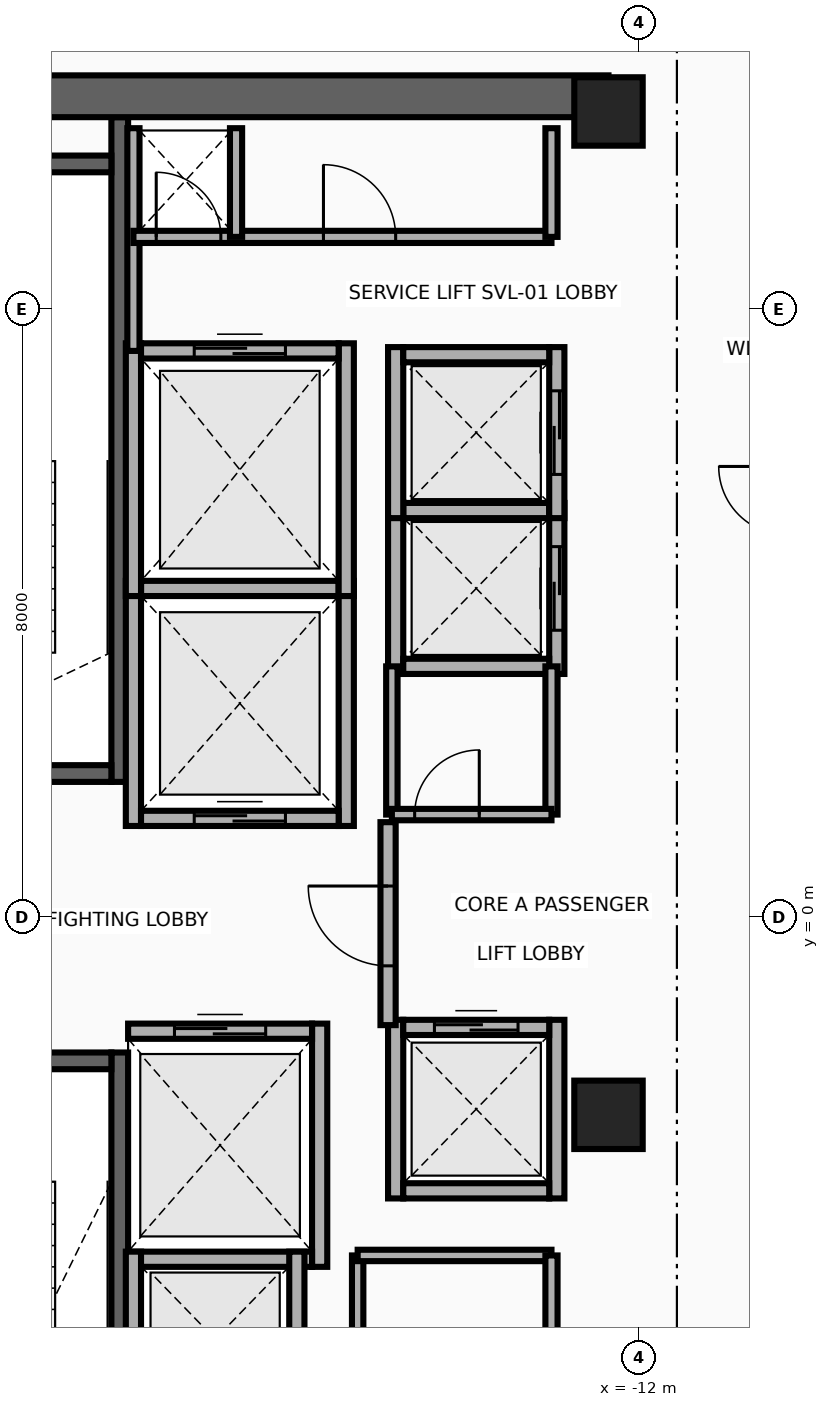
"""IFC4 building model, lengths in metres.
Left out: names, types, materials, properties, quantities, classifications, styles, units other than length and angle.
Written with IfcOpenShell. Run it as: python <this file> out.ifc"""

import sys

from ifc_helpers import new_model, si_unit, direction, frame, frame_2d, origin, origin_2d, place, context, subcontext, project, spatial, rectangle, extrude, source, transform, mapped, element, fill, save


model = new_model("IFC4")
c1 = context("Model", 3, precision=1e-05, world=origin(), true_north=direction((0.0, 1.0)))
c2 = subcontext(c1, "Body", "Model", "MODEL_VIEW")
j1 = project(units=[si_unit("LENGTHUNIT", "METRE"), si_unit("PLANEANGLEUNIT", "RADIAN")], contexts=[c1])
p1 = place(None, origin())
s1 = spatial("IfcSite", under=j1, at=p1, CompositionType="ELEMENT")
p2 = place(p1, origin())
s2 = spatial("IfcBuilding", under=s1, at=p2, CompositionType="ELEMENT")
p3 = place(p2, frame((0.0, 0.0, 219.5)))
s3 = spatial("IfcBuildingStorey", under=s2, at=p3, CompositionType="ELEMENT", Elevation=219.5)
p4 = place(p3, frame((-18.83, 1.78, 0.0), z_axis=(0.0, 0.0, 1.0), x_axis=(0.0, 1.0, 0.0)))
e1 = element("IfcWall", 1, at=p4, inside=s3, PredefinedType="SHEAR", context=c2, shape_type="SweptSolid", body=[
    extrude(rectangle(XDim=8.745, YDim=0.22, at=frame_2d((4.373, 0.0))), origin(), (0.0, 0.0, 1.0), 3.26),
])
p5 = place(p3, frame((-22.05, 1.89, 0.0), z_axis=(0.0, 0.0, 1.0), x_axis=(1.0, 0.0, 0.0)))
e2 = element("IfcWall", 2, at=p5, inside=s3, PredefinedType="SHEAR", context=c2, shape_type="SweptSolid", body=[
    extrude(rectangle(XDim=3.11, YDim=0.22, at=frame_2d((1.555, 0.0))), origin(), (0.0, 0.0, 1.0), 3.26),
])
p6 = place(p5, frame((1.0, 0.0, 0.0)))
e3 = element("IfcOpeningElement", 3, at=p6, cuts=e2, PredefinedType="OPENING", context=c2, shape_type="SweptSolid", body=[
    extrude(rectangle(XDim=1.1, YDim=2.15, at=frame_2d((0.55, 1.075))), frame((0.0, 0.125, 0.0), z_axis=(0.0, -1.0, 0.0), x_axis=(1.0, 0.0, 0.0)), (0.0, 0.0, 1.0), 0.25),
])
p7 = place(p3, frame((-22.05, 9.91, 0.0), z_axis=(0.0, 0.0, 1.0), x_axis=(1.0, 0.0, 0.0)))
e4 = element("IfcWall", 4, at=p7, inside=s3, PredefinedType="SHEAR", context=c2, shape_type="SweptSolid", body=[
    extrude(rectangle(XDim=3.11, YDim=0.22, at=frame_2d((1.555, 0.0))), origin(), (0.0, 0.0, 1.0), 3.26),
])
p8 = place(p3, frame((-18.83, -10.525, 0.0), z_axis=(0.0, 0.0, 1.0), x_axis=(0.0, 1.0, 0.0)))
e5 = element("IfcWall", 5, at=p8, inside=s3, PredefinedType="SHEAR", context=c2, shape_type="SweptSolid", body=[
    extrude(rectangle(XDim=8.745, YDim=0.22, at=frame_2d((4.373, 0.0))), origin(), (0.0, 0.0, 1.0), 3.26),
])
p9 = place(p3, frame((-22.05, -1.89, 0.0), z_axis=(0.0, 0.0, 1.0), x_axis=(1.0, 0.0, 0.0)))
e6 = element("IfcWall", 6, at=p9, inside=s3, PredefinedType="SHEAR", context=c2, shape_type="SweptSolid", body=[
    extrude(rectangle(XDim=3.11, YDim=0.22, at=frame_2d((1.555, 0.0))), origin(), (0.0, 0.0, 1.0), 3.26),
])
p10 = place(p9, frame((1.0, 0.0, 0.0)))
e7 = element("IfcOpeningElement", 7, at=p10, cuts=e6, PredefinedType="OPENING", context=c2, shape_type="SweptSolid", body=[
    extrude(rectangle(XDim=1.1, YDim=2.15, at=frame_2d((0.55, 1.075))), frame((0.0, 0.125, 0.0), z_axis=(0.0, -1.0, 0.0), x_axis=(1.0, 0.0, 0.0)), (0.0, 0.0, 1.0), 0.25),
])
p11 = place(p3, frame((-22.65, 10.8, 0.0), z_axis=(0.0, 0.0, 1.0), x_axis=(1.0, 0.0, 0.0)))
e8 = element("IfcWall", 8, at=p11, inside=s3, PredefinedType="SHEAR", context=c2, shape_type="SweptSolid", body=[
    extrude(rectangle(XDim=10.25, YDim=0.55, at=frame_2d((5.125, 0.0))), origin(), (0.0, 0.0, 1.0), 3.26),
])
m1 = source(origin(), c2, "Body", "SweptSolid", [
    extrude(rectangle(XDim=0.9, YDim=0.9, at=origin_2d()), origin(), (0.0, 0.0, 1.0), 3.5),
])
for number, where, z_axis, x_axis in (
    (9, (-12.4, -2.6, 0.0), (0.0, 0.0, 1.0), (1.0, 0.0, 0.0)),
    (10, (-12.4, 10.6, 0.0), (0.0, 0.0, 1.0), (1.0, 0.0, 0.0)),
):
    element("IfcColumn", number, at=place(p3, frame(where, z_axis=z_axis, x_axis=x_axis)), inside=s3, PredefinedType="COLUMN", context=c2, shape_type="MappedRepresentation", body=[
        mapped(m1, transform((0.0, 0.0, 0.0), x_axis=(1.0, 0.0, 0.0), y_axis=(0.0, 1.0, 0.0), z_axis=(0.0, 0.0, 1.0), scale=1.0)),
    ])
for number, where, z_axis, x_axis in (
    (11, (-18.65, 1.2, 0.0), (0.0, 0.0, 1.0), (0.0, 1.0, 0.0)),
    (12, (-15.85, 1.2, 0.0), (0.0, 0.0, 1.0), (0.0, 1.0, 0.0)),
):
    element("IfcWall", number, at=place(p3, frame(where, z_axis=z_axis, x_axis=x_axis)), inside=s3, PredefinedType="MOVABLE", context=c2, shape_type="SweptSolid", body=[
        extrude(rectangle(XDim=3.225, YDim=0.2, at=frame_2d((1.613, 0.0))), origin(), (0.0, 0.0, 1.0), 3.26),
    ])
p12 = place(p3, frame((-18.55, 1.3, 0.0), z_axis=(0.0, 0.0, 1.0), x_axis=(1.0, 0.0, 0.0)))
e13 = element("IfcWall", 13, at=p12, inside=s3, PredefinedType="MOVABLE", context=c2, shape_type="SweptSolid", body=[
    extrude(rectangle(XDim=2.6, YDim=0.2, at=frame_2d((1.3, 0.0))), origin(), (0.0, 0.0, 1.0), 3.26),
])
p13 = place(p12, frame((0.7, 0.0, 0.0)))
e14 = element("IfcOpeningElement", 14, at=p13, cuts=e13, PredefinedType="OPENING", context=c2, shape_type="SweptSolid", body=[
    extrude(rectangle(XDim=1.2, YDim=2.1, at=frame_2d((0.6, 1.05))), frame((0.0, 0.115, 0.0), z_axis=(0.0, -1.0, 0.0), x_axis=(1.0, 0.0, 0.0)), (0.0, 0.0, 1.0), 0.23),
])
p14 = place(p3, frame((-18.55, 4.325, 0.0), z_axis=(0.0, 0.0, 1.0), x_axis=(1.0, 0.0, 0.0)))
e15 = element("IfcWall", 15, at=p14, inside=s3, PredefinedType="MOVABLE", context=c2, shape_type="SweptSolid", body=[
    extrude(rectangle(XDim=2.6, YDim=0.2, at=frame_2d((1.3, 0.0))), origin(), (0.0, 0.0, 1.0), 3.26),
])
p15 = place(p3, frame((-16.2, -4.6, 0.0), z_axis=(0.0, 0.0, 1.0), x_axis=(0.0, 1.0, 0.0)))
e16 = element("IfcWall", 16, at=p15, inside=s3, PredefinedType="MOVABLE", context=c2, shape_type="SweptSolid", body=[
    extrude(rectangle(XDim=3.2, YDim=0.2, at=frame_2d((1.6, 0.0))), origin(), (0.0, 0.0, 1.0), 3.26),
])
p16 = place(p3, frame((-18.72, -4.5, 0.0), z_axis=(0.0, 0.0, 1.0), x_axis=(1.0, 0.0, 0.0)))
e17 = element("IfcWall", 17, at=p16, inside=s3, PredefinedType="MOVABLE", context=c2, shape_type="SweptSolid", body=[
    extrude(rectangle(XDim=2.42, YDim=0.2, at=frame_2d((1.21, 0.0))), origin(), (0.0, 0.0, 1.0), 3.26),
])
p17 = place(p3, frame((-18.72, -1.5, 0.0), z_axis=(0.0, 0.0, 1.0), x_axis=(1.0, 0.0, 0.0)))
e18 = element("IfcWall", 18, at=p17, inside=s3, PredefinedType="MOVABLE", context=c2, shape_type="SweptSolid", body=[
    extrude(rectangle(XDim=2.42, YDim=0.2, at=frame_2d((1.21, 0.0))), origin(), (0.0, 0.0, 1.0), 3.26),
])
p18 = place(p17, frame((0.61, 0.0, 0.0)))
e19 = element("IfcOpeningElement", 19, at=p18, cuts=e18, PredefinedType="OPENING", context=c2, shape_type="SweptSolid", body=[
    extrude(rectangle(XDim=1.2, YDim=2.1, at=frame_2d((0.6, 1.05))), frame((0.0, 0.115, 0.0), z_axis=(0.0, -1.0, 0.0), x_axis=(1.0, 0.0, 0.0)), (0.0, 0.0, 1.0), 0.23),
])
for number, where, z_axis, x_axis in (
    (20, (-18.65, 4.225, 0.0), (0.0, 0.0, 1.0), (0.0, 1.0, 0.0)),
    (21, (-15.85, 4.225, 0.0), (0.0, 0.0, 1.0), (0.0, 1.0, 0.0)),
):
    element("IfcWall", number, at=place(p3, frame(where, z_axis=z_axis, x_axis=x_axis)), inside=s3, PredefinedType="MOVABLE", context=c2, shape_type="SweptSolid", body=[
        extrude(rectangle(XDim=3.325, YDim=0.2, at=frame_2d((1.663, 0.0))), origin(), (0.0, 0.0, 1.0), 3.26),
    ])
p19 = place(p3, frame((-18.55, 7.45, 0.0), z_axis=(0.0, 0.0, 1.0), x_axis=(1.0, 0.0, 0.0)))
e22 = element("IfcWall", 22, at=p19, inside=s3, PredefinedType="MOVABLE", context=c2, shape_type="SweptSolid", body=[
    extrude(rectangle(XDim=2.6, YDim=0.2, at=frame_2d((1.3, 0.0))), origin(), (0.0, 0.0, 1.0), 3.26),
])
p20 = place(p19, frame((0.7, 0.0, 0.0)))
e23 = element("IfcOpeningElement", 23, at=p20, cuts=e22, PredefinedType="OPENING", context=c2, shape_type="SweptSolid", body=[
    extrude(rectangle(XDim=1.2, YDim=2.1, at=frame_2d((0.6, 1.05))), frame((0.0, 0.115, 0.0), z_axis=(0.0, -1.0, 0.0), x_axis=(1.0, 0.0, 0.0)), (0.0, 0.0, 1.0), 0.23),
])
p21 = place(p3, frame((-15.2, 3.2, 0.0), z_axis=(0.0, 0.0, 1.0), x_axis=(0.0, 1.0, 0.0)))
e24 = element("IfcWall", 24, at=p21, inside=s3, PredefinedType="MOVABLE", context=c2, shape_type="SweptSolid", body=[
    extrude(rectangle(XDim=2.25, YDim=0.2, at=frame_2d((1.125, 0.0))), origin(), (0.0, 0.0, 1.0), 3.26),
])
p22 = place(p3, frame((-13.08, 3.2, 0.0), z_axis=(0.0, 0.0, 1.0), x_axis=(0.0, 1.0, 0.0)))
e25 = element("IfcWall", 25, at=p22, inside=s3, PredefinedType="MOVABLE", context=c2, shape_type="SweptSolid", body=[
    extrude(rectangle(XDim=2.25, YDim=0.2, at=frame_2d((1.125, 0.0))), origin(), (0.0, 0.0, 1.0), 3.26),
])
p23 = place(p22, frame((0.575, 0.0, 0.0)))
e26 = element("IfcOpeningElement", 26, at=p23, cuts=e25, PredefinedType="OPENING", context=c2, shape_type="SweptSolid", body=[
    extrude(rectangle(XDim=1.1, YDim=2.1, at=frame_2d((0.55, 1.05))), frame((0.0, 0.115, 0.0), z_axis=(0.0, -1.0, 0.0), x_axis=(1.0, 0.0, 0.0)), (0.0, 0.0, 1.0), 0.23),
])
for number, where, z_axis, x_axis in (
    (27, (-15.1, 3.3, 0.0), (0.0, 0.0, 1.0), (1.0, 0.0, 0.0)),
    (28, (-15.1, 5.35, 0.0), (0.0, 0.0, 1.0), (1.0, 0.0, 0.0)),
):
    element("IfcWall", number, at=place(p3, frame(where, z_axis=z_axis, x_axis=x_axis)), inside=s3, PredefinedType="MOVABLE", context=c2, shape_type="SweptSolid", body=[
        extrude(rectangle(XDim=1.92, YDim=0.2, at=frame_2d((0.96, 0.0))), origin(), (0.0, 0.0, 1.0), 3.26),
    ])
p24 = place(p3, frame((-15.2, 5.25, 0.0), z_axis=(0.0, 0.0, 1.0), x_axis=(0.0, 1.0, 0.0)))
e29 = element("IfcWall", 29, at=p24, inside=s3, PredefinedType="MOVABLE", context=c2, shape_type="SweptSolid", body=[
    extrude(rectangle(XDim=2.25, YDim=0.2, at=frame_2d((1.125, 0.0))), origin(), (0.0, 0.0, 1.0), 3.26),
])
p25 = place(p3, frame((-13.08, 5.25, 0.0), z_axis=(0.0, 0.0, 1.0), x_axis=(0.0, 1.0, 0.0)))
e30 = element("IfcWall", 30, at=p25, inside=s3, PredefinedType="MOVABLE", context=c2, shape_type="SweptSolid", body=[
    extrude(rectangle(XDim=2.25, YDim=0.2, at=frame_2d((1.125, 0.0))), origin(), (0.0, 0.0, 1.0), 3.26),
])
p26 = place(p25, frame((0.575, 0.0, 0.0)))
e31 = element("IfcOpeningElement", 31, at=p26, cuts=e30, PredefinedType="OPENING", context=c2, shape_type="SweptSolid", body=[
    extrude(rectangle(XDim=1.1, YDim=2.1, at=frame_2d((0.55, 1.05))), frame((0.0, 0.115, 0.0), z_axis=(0.0, -1.0, 0.0), x_axis=(1.0, 0.0, 0.0)), (0.0, 0.0, 1.0), 0.23),
])
p27 = place(p3, frame((-15.1, 7.4, 0.0), z_axis=(0.0, 0.0, 1.0), x_axis=(1.0, 0.0, 0.0)))
e32 = element("IfcWall", 32, at=p27, inside=s3, PredefinedType="MOVABLE", context=c2, shape_type="SweptSolid", body=[
    extrude(rectangle(XDim=1.92, YDim=0.2, at=frame_2d((0.96, 0.0))), origin(), (0.0, 0.0, 1.0), 3.26),
])
for number, where, z_axis, x_axis in (
    (33, (-18.65, -6.7, 0.0), (0.0, 0.0, 1.0), (0.0, 1.0, 0.0)),
    (34, (-16.5, -6.7, 0.0), (0.0, 0.0, 1.0), (0.0, 1.0, 0.0)),
):
    element("IfcWall", number, at=place(p3, frame(where, z_axis=z_axis, x_axis=x_axis)), inside=s3, PredefinedType="MOVABLE", context=c2, shape_type="SweptSolid", body=[
        extrude(rectangle(XDim=2.3, YDim=0.2, at=frame_2d((1.15, 0.0))), origin(), (0.0, 0.0, 1.0), 3.26),
    ])
for number, where, z_axis, x_axis in (
    (35, (-15.2, -3.7, 0.0), (0.0, 0.0, 1.0), (0.0, 1.0, 0.0)),
    (36, (-13.08, -3.7, 0.0), (0.0, 0.0, 1.0), (0.0, 1.0, 0.0)),
):
    element("IfcWall", number, at=place(p3, frame(where, z_axis=z_axis, x_axis=x_axis)), inside=s3, PredefinedType="MOVABLE", context=c2, shape_type="SweptSolid", body=[
        extrude(rectangle(XDim=2.35, YDim=0.2, at=frame_2d((1.175, 0.0))), origin(), (0.0, 0.0, 1.0), 3.26),
    ])
p28 = place(p3, frame((-15.1, -3.6, 0.0), z_axis=(0.0, 0.0, 1.0), x_axis=(1.0, 0.0, 0.0)))
e37 = element("IfcWall", 37, at=p28, inside=s3, PredefinedType="MOVABLE", context=c2, shape_type="SweptSolid", body=[
    extrude(rectangle(XDim=1.92, YDim=0.2, at=frame_2d((0.96, 0.0))), origin(), (0.0, 0.0, 1.0), 3.26),
])
p29 = place(p3, frame((-15.1, -1.45, 0.0), z_axis=(0.0, 0.0, 1.0), x_axis=(1.0, 0.0, 0.0)))
e38 = element("IfcWall", 38, at=p29, inside=s3, PredefinedType="MOVABLE", context=c2, shape_type="SweptSolid", body=[
    extrude(rectangle(XDim=1.92, YDim=0.2, at=frame_2d((0.96, 0.0))), origin(), (0.0, 0.0, 1.0), 3.26),
])
p30 = place(p29, frame((0.41, 0.0, 0.0)))
e39 = element("IfcOpeningElement", 39, at=p30, cuts=e38, PredefinedType="OPENING", context=c2, shape_type="SweptSolid", body=[
    extrude(rectangle(XDim=1.1, YDim=2.1, at=frame_2d((0.55, 1.05))), frame((0.0, 0.115, 0.0), z_axis=(0.0, -1.0, 0.0), x_axis=(1.0, 0.0, 0.0)), (0.0, 0.0, 1.0), 0.23),
])
p31 = place(p3, frame((-15.3, -1.42, 0.0), z_axis=(0.0, 0.0, 1.0), x_axis=(0.0, 1.0, 0.0)))
e40 = element("IfcWall", 40, at=p31, inside=s3, PredefinedType="PARTITIONING", context=c2, shape_type="SweptSolid", body=[
    extrude(rectangle(XDim=2.67, YDim=0.2, at=frame_2d((1.335, 0.0))), origin(), (0.0, 0.0, 1.0), 3.26),
])
p32 = place(p31, frame((0.78, 0.0, 0.0)))
e41 = element("IfcOpeningElement", 41, at=p32, cuts=e40, PredefinedType="OPENING", context=c2, shape_type="SweptSolid", body=[
    extrude(rectangle(XDim=1.05, YDim=2.15, at=frame_2d((0.525, 1.075))), frame((0.0, 0.115, 0.0), z_axis=(0.0, -1.0, 0.0), x_axis=(1.0, 0.0, 0.0)), (0.0, 0.0, 1.0), 0.23),
])
p33 = place(p3, frame((-18.65, 7.45, 0.0), z_axis=(0.0, 0.0, 1.0), x_axis=(0.0, 1.0, 0.0)))
e42 = element("IfcWall", 42, at=p33, inside=s3, PredefinedType="PARTITIONING", context=c2, shape_type="SweptSolid", body=[
    extrude(rectangle(XDim=2.93, YDim=0.16, at=frame_2d((1.465, 0.0))), origin(), (0.0, 0.0, 1.0), 3.26),
])
p34 = place(p3, frame((-18.65, 8.95, 0.0), z_axis=(0.0, 0.0, 1.0), x_axis=(1.0, 0.0, 0.0)))
e43 = element("IfcWall", 43, at=p34, inside=s3, PredefinedType="PARTITIONING", context=c2, shape_type="SweptSolid", body=[
    extrude(rectangle(XDim=5.5, YDim=0.16, at=frame_2d((2.75, 0.0))), origin(), (0.0, 0.0, 1.0), 3.26),
])
p35 = place(p34, frame((0.3, 0.0, 0.0)))
e44 = element("IfcOpeningElement", 44, at=p35, cuts=e43, PredefinedType="OPENING", context=c2, shape_type="SweptSolid", body=[
    extrude(rectangle(XDim=0.85, YDim=2.05, at=frame_2d((0.425, 1.025))), frame((0.0, 0.095, 0.0), z_axis=(0.0, -1.0, 0.0), x_axis=(1.0, 0.0, 0.0)), (0.0, 0.0, 1.0), 0.19),
])
p36 = place(p34, frame((2.5, 0.0, 0.0)))
e45 = element("IfcOpeningElement", 45, at=p36, cuts=e43, PredefinedType="OPENING", context=c2, shape_type="SweptSolid", body=[
    extrude(rectangle(XDim=0.95, YDim=2.15, at=frame_2d((0.475, 1.075))), frame((0.0, 0.095, 0.0), z_axis=(0.0, -1.0, 0.0), x_axis=(1.0, 0.0, 0.0)), (0.0, 0.0, 1.0), 0.19),
])
for number, where, z_axis, x_axis in (
    (46, (-13.15, 8.95, 0.0), (0.0, 0.0, 1.0), (0.0, 1.0, 0.0)),
    (47, (-17.3, 8.95, 0.0), (0.0, 0.0, 1.0), (0.0, 1.0, 0.0)),
):
    element("IfcWall", number, at=place(p3, frame(where, z_axis=z_axis, x_axis=x_axis)), inside=s3, PredefinedType="PARTITIONING", context=c2, shape_type="SweptSolid", body=[
        extrude(rectangle(XDim=1.43, YDim=0.16, at=frame_2d((0.715, 0.0))), origin(), (0.0, 0.0, 1.0), 3.26),
    ])
p37 = place(p3, frame((-15.7, -6.58, 0.0), z_axis=(0.0, 0.0, 1.0), x_axis=(0.0, 1.0, 0.0)))
e48 = element("IfcWall", 48, at=p37, inside=s3, PredefinedType="PARTITIONING", context=c2, shape_type="SweptSolid", body=[
    extrude(rectangle(XDim=2.13, YDim=0.15, at=frame_2d((1.065, 0.0))), origin(), (0.0, 0.0, 1.0), 3.26),
])
p38 = place(p3, frame((-15.7, -4.45, 0.0), z_axis=(0.0, 0.0, 1.0), x_axis=(1.0, 0.0, 0.0)))
e49 = element("IfcWall", 49, at=p38, inside=s3, PredefinedType="PARTITIONING", context=c2, shape_type="SweptSolid", body=[
    extrude(rectangle(XDim=2.55, YDim=0.15, at=frame_2d((1.275, 0.0))), origin(), (0.0, 0.0, 1.0), 3.26),
])
p39 = place(p3, frame((-13.15, -6.58, 0.0), z_axis=(0.0, 0.0, 1.0), x_axis=(0.0, 1.0, 0.0)))
e50 = element("IfcWall", 50, at=p39, inside=s3, PredefinedType="PARTITIONING", context=c2, shape_type="SweptSolid", body=[
    extrude(rectangle(XDim=2.13, YDim=0.16, at=frame_2d((1.065, 0.0))), origin(), (0.0, 0.0, 1.0), 3.26),
])
p40 = place(p3, frame((-13.15, 1.35, 0.0), z_axis=(0.0, 0.0, 1.0), x_axis=(0.0, 1.0, 0.0)))
e51 = element("IfcWall", 51, at=p40, inside=s3, PredefinedType="PARTITIONING", context=c2, shape_type="SweptSolid", body=[
    extrude(rectangle(XDim=1.95, YDim=0.16, at=frame_2d((0.975, 0.0))), origin(), (0.0, 0.0, 1.0), 3.26),
])
p41 = place(p3, frame((-15.25, 1.35, 0.0), z_axis=(0.0, 0.0, 1.0), x_axis=(0.0, 1.0, 0.0)))
e52 = element("IfcWall", 52, at=p41, inside=s3, PredefinedType="PARTITIONING", context=c2, shape_type="SweptSolid", body=[
    extrude(rectangle(XDim=1.95, YDim=0.15, at=frame_2d((0.975, 0.0))), origin(), (0.0, 0.0, 1.0), 3.26),
])
p42 = place(p3, frame((-15.25, 1.35, 0.0), z_axis=(0.0, 0.0, 1.0), x_axis=(1.0, 0.0, 0.0)))
e53 = element("IfcWall", 53, at=p42, inside=s3, PredefinedType="PARTITIONING", context=c2, shape_type="SweptSolid", body=[
    extrude(rectangle(XDim=2.1, YDim=0.15, at=frame_2d((1.05, 0.0))), origin(), (0.0, 0.0, 1.0), 3.26),
])
p43 = place(p42, frame((0.3, 0.0, 0.0)))
e54 = element("IfcOpeningElement", 54, at=p43, cuts=e53, PredefinedType="OPENING", context=c2, shape_type="SweptSolid", body=[
    extrude(rectangle(XDim=0.85, YDim=2.05, at=frame_2d((0.425, 1.025))), frame((0.0, 0.09, 0.0), z_axis=(0.0, -1.0, 0.0), x_axis=(1.0, 0.0, 0.0)), (0.0, 0.0, 1.0), 0.18),
])
p44 = place(p13, origin())
e55 = element("IfcDoor", 55, at=p44, inside=s3, OperationType="DOUBLE_DOOR_SLIDING", PredefinedType="DOOR", context=c2, shape_type="SweptSolid", body=[
    extrude(rectangle(XDim=1.2, YDim=2.1, at=frame_2d((0.6, 1.05))), frame((0.0, 0.025, 0.0), z_axis=(0.0, -1.0, 0.0), x_axis=(1.0, 0.0, 0.0)), (0.0, 0.0, 1.0), 0.05),
])
fill(e14, e55)
p45 = place(p18, origin())
e56 = element("IfcDoor", 56, at=p45, inside=s3, OperationType="DOUBLE_DOOR_SLIDING", PredefinedType="DOOR", context=c2, shape_type="SweptSolid", body=[
    extrude(rectangle(XDim=1.2, YDim=2.1, at=frame_2d((0.6, 1.05))), frame((0.0, 0.025, 0.0), z_axis=(0.0, -1.0, 0.0), x_axis=(1.0, 0.0, 0.0)), (0.0, 0.0, 1.0), 0.05),
])
fill(e19, e56)
p46 = place(p20, origin())
e57 = element("IfcDoor", 57, at=p46, inside=s3, OperationType="DOUBLE_DOOR_SLIDING", PredefinedType="DOOR", context=c2, shape_type="SweptSolid", body=[
    extrude(rectangle(XDim=1.2, YDim=2.1, at=frame_2d((0.6, 1.05))), frame((0.0, 0.025, 0.0), z_axis=(0.0, -1.0, 0.0), x_axis=(1.0, 0.0, 0.0)), (0.0, 0.0, 1.0), 0.05),
])
fill(e23, e57)
p47 = place(p23, origin())
e58 = element("IfcDoor", 58, at=p47, inside=s3, OperationType="DOUBLE_DOOR_SLIDING", PredefinedType="DOOR", context=c2, shape_type="SweptSolid", body=[
    extrude(rectangle(XDim=1.1, YDim=2.1, at=frame_2d((0.55, 1.05))), frame((0.0, 0.025, 0.0), z_axis=(0.0, -1.0, 0.0), x_axis=(1.0, 0.0, 0.0)), (0.0, 0.0, 1.0), 0.05),
])
fill(e26, e58)
p48 = place(p26, origin())
e59 = element("IfcDoor", 59, at=p48, inside=s3, OperationType="DOUBLE_DOOR_SLIDING", PredefinedType="DOOR", context=c2, shape_type="SweptSolid", body=[
    extrude(rectangle(XDim=1.1, YDim=2.1, at=frame_2d((0.55, 1.05))), frame((0.0, 0.025, 0.0), z_axis=(0.0, -1.0, 0.0), x_axis=(1.0, 0.0, 0.0)), (0.0, 0.0, 1.0), 0.05),
])
fill(e31, e59)
p49 = place(p30, origin())
e60 = element("IfcDoor", 60, at=p49, inside=s3, OperationType="DOUBLE_DOOR_SLIDING", PredefinedType="DOOR", context=c2, shape_type="SweptSolid", body=[
    extrude(rectangle(XDim=1.1, YDim=2.1, at=frame_2d((0.55, 1.05))), frame((0.0, 0.025, 0.0), z_axis=(0.0, -1.0, 0.0), x_axis=(1.0, 0.0, 0.0)), (0.0, 0.0, 1.0), 0.05),
])
fill(e39, e60)
p50 = place(p32, origin())
e61 = element("IfcDoor", 61, at=p50, inside=s3, OperationType="SINGLE_SWING_RIGHT", PredefinedType="DOOR", context=c2, shape_type="SweptSolid", body=[
    extrude(rectangle(XDim=1.05, YDim=2.15, at=frame_2d((0.525, 1.075))), frame((0.0, 0.025, 0.0), z_axis=(0.0, -1.0, 0.0), x_axis=(1.0, 0.0, 0.0)), (0.0, 0.0, 1.0), 0.05),
])
fill(e41, e61)
p51 = place(p35, origin())
e62 = element("IfcDoor", 62, at=p51, inside=s3, OperationType="SINGLE_SWING_LEFT", PredefinedType="DOOR", context=c2, shape_type="SweptSolid", body=[
    extrude(rectangle(XDim=0.85, YDim=2.05, at=frame_2d((0.425, 1.025))), frame((0.0, 0.025, 0.0), z_axis=(0.0, -1.0, 0.0), x_axis=(1.0, 0.0, 0.0)), (0.0, 0.0, 1.0), 0.05),
])
fill(e44, e62)
p52 = place(p36, origin())
e63 = element("IfcDoor", 63, at=p52, inside=s3, OperationType="SINGLE_SWING_RIGHT", PredefinedType="DOOR", context=c2, shape_type="SweptSolid", body=[
    extrude(rectangle(XDim=0.95, YDim=2.15, at=frame_2d((0.475, 1.075))), frame((0.0, 0.025, 0.0), z_axis=(0.0, -1.0, 0.0), x_axis=(1.0, 0.0, 0.0)), (0.0, 0.0, 1.0), 0.05),
])
fill(e45, e63)
p53 = place(p43, origin())
e64 = element("IfcDoor", 64, at=p53, inside=s3, OperationType="SINGLE_SWING_LEFT", PredefinedType="DOOR", context=c2, shape_type="SweptSolid", body=[
    extrude(rectangle(XDim=0.85, YDim=2.05, at=frame_2d((0.425, 1.025))), frame((0.0, 0.025, 0.0), z_axis=(0.0, -1.0, 0.0), x_axis=(1.0, 0.0, 0.0)), (0.0, 0.0, 1.0), 0.05),
])
fill(e54, e64)
save(model, sys.argv[1])
